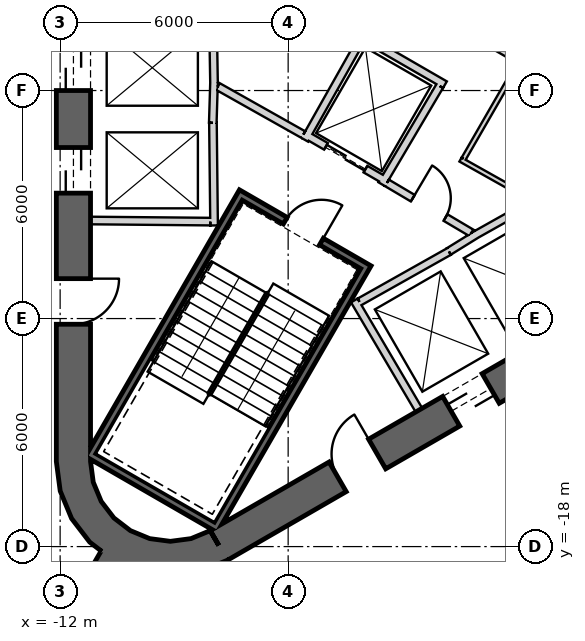
"""IFC4 building model, lengths in metres.
Left out: names, types, materials, properties, quantities, classifications, styles, units other than length and angle.
Written with IfcOpenShell. Run it as: python <this file> out.ifc"""

import sys

from ifc_helpers import new_model, si_unit, direction, frame, frame_2d, origin, place, context, subcontext, project, spatial, polyline, rectangle, outline, extrude, element, fill, save


model = new_model("IFC4")
c1 = context("Model", 3, precision=1e-05, world=origin(), true_north=direction((0.0, 1.0)))
c2 = subcontext(c1, "Body", "Model", "MODEL_VIEW")
j1 = project(units=[si_unit("LENGTHUNIT", "METRE"), si_unit("PLANEANGLEUNIT", "RADIAN")], contexts=[c1])
p1 = place(None, origin())
s1 = spatial("IfcSite", under=j1, at=p1, CompositionType="ELEMENT")
p2 = place(p1, origin())
s2 = spatial("IfcBuilding", under=s1, at=p2, CompositionType="ELEMENT")
p3 = place(p2, frame((0.0, 0.0, 107.0)))
s3 = spatial("IfcBuildingStorey", under=s2, at=p3, CompositionType="ELEMENT", Elevation=107.0)
p4 = place(p3, frame((-11.65, 15.762, 0.0), z_axis=(0.0, 0.0, 1.0), x_axis=(0.0, -1.0, 0.0)))
e1 = element("IfcWall", 1, at=p4, inside=s3, PredefinedType="SHEAR", context=c2, shape_type="SweptSolid", body=[
    extrude(rectangle(XDim=31.523, YDim=0.9, at=frame_2d((15.762, 0.0))), origin(), (0.0, 0.0, 1.0), 4.1),
])
p5 = place(p4, frame((7.062, 0.0, 0.0)))
e2 = element("IfcOpeningElement", 2, at=p5, cuts=e1, PredefinedType="OPENING", context=c2, shape_type="SweptSolid", body=[
    extrude(rectangle(XDim=1.2, YDim=2.4, at=frame_2d((0.6, 1.2))), frame((0.0, 0.46, 0.0), z_axis=(0.0, -1.0, 0.0), x_axis=(1.0, 0.0, 0.0)), (0.0, 0.0, 1.0), 0.92),
])
p6 = place(p4, frame((9.762, 0.0, 0.0)))
e3 = element("IfcOpeningElement", 3, at=p6, cuts=e1, PredefinedType="OPENING", context=c2, shape_type="SweptSolid", body=[
    extrude(rectangle(XDim=1.2, YDim=2.4, at=frame_2d((0.6, 1.2))), frame((0.0, 0.46, 0.0), z_axis=(0.0, -1.0, 0.0), x_axis=(1.0, 0.0, 0.0)), (0.0, 0.0, 1.0), 0.92),
])
p7 = place(p4, frame((12.462, 0.0, 0.0)))
e4 = element("IfcOpeningElement", 4, at=p7, cuts=e1, PredefinedType="OPENING", context=c2, shape_type="SweptSolid", body=[
    extrude(rectangle(XDim=1.2, YDim=2.4, at=frame_2d((0.6, 1.2))), frame((0.0, 0.46, 0.0), z_axis=(0.0, -1.0, 0.0), x_axis=(1.0, 0.0, 0.0)), (0.0, 0.0, 1.0), 0.92),
])
p8 = place(p4, frame((15.162, 0.0, 0.0)))
e5 = element("IfcOpeningElement", 5, at=p8, cuts=e1, PredefinedType="OPENING", context=c2, shape_type="SweptSolid", body=[
    extrude(rectangle(XDim=1.2, YDim=2.4, at=frame_2d((0.6, 1.2))), frame((0.0, 0.46, 0.0), z_axis=(0.0, -1.0, 0.0), x_axis=(1.0, 0.0, 0.0)), (0.0, 0.0, 1.0), 0.92),
])
p9 = place(p4, frame((17.862, 0.0, 0.0)))
e6 = element("IfcOpeningElement", 6, at=p9, cuts=e1, PredefinedType="OPENING", context=c2, shape_type="SweptSolid", body=[
    extrude(rectangle(XDim=1.2, YDim=2.4, at=frame_2d((0.6, 1.2))), frame((0.0, 0.46, 0.0), z_axis=(0.0, -1.0, 0.0), x_axis=(1.0, 0.0, 0.0)), (0.0, 0.0, 1.0), 0.92),
])
p10 = place(p4, frame((20.562, 0.0, 0.0)))
e7 = element("IfcOpeningElement", 7, at=p10, cuts=e1, PredefinedType="OPENING", context=c2, shape_type="SweptSolid", body=[
    extrude(rectangle(XDim=1.2, YDim=2.4, at=frame_2d((0.6, 1.2))), frame((0.0, 0.46, 0.0), z_axis=(0.0, -1.0, 0.0), x_axis=(1.0, 0.0, 0.0)), (0.0, 0.0, 1.0), 0.92),
])
p11 = place(p4, frame((23.262, 0.0, 0.0)))
e8 = element("IfcOpeningElement", 8, at=p11, cuts=e1, PredefinedType="OPENING", context=c2, shape_type="SweptSolid", body=[
    extrude(rectangle(XDim=1.2, YDim=2.4, at=frame_2d((0.6, 1.2))), frame((0.0, 0.46, 0.0), z_axis=(0.0, -1.0, 0.0), x_axis=(1.0, 0.0, 0.0)), (0.0, 0.0, 1.0), 0.92),
])
p12 = place(p4, frame((3.612, 0.0, 0.0)))
e9 = element("IfcOpeningElement", 9, at=p12, cuts=e1, PredefinedType="OPENING", context=c2, shape_type="SweptSolid", body=[
    extrude(rectangle(XDim=1.2, YDim=2.4, at=frame_2d((0.6, 1.2))), frame((0.0, 0.46, 0.0), z_axis=(0.0, -1.0, 0.0), x_axis=(1.0, 0.0, 0.0)), (0.0, 0.0, 1.0), 0.92),
])
p13 = place(p4, frame((26.712, 0.0, 0.0)))
e10 = element("IfcOpeningElement", 10, at=p13, cuts=e1, PredefinedType="OPENING", context=c2, shape_type="SweptSolid", body=[
    extrude(rectangle(XDim=1.2, YDim=2.4, at=frame_2d((0.6, 1.2))), frame((0.0, 0.46, 0.0), z_axis=(0.0, -1.0, 0.0), x_axis=(1.0, 0.0, 0.0)), (0.0, 0.0, 1.0), 0.92),
])
p14 = place(p3, frame((-7.825, -17.97, 0.0), z_axis=(0.0, 0.0, 1.0), x_axis=(0.866028369851, 0.499994862586, 0.0)))
e11 = element("IfcWall", 11, at=p14, inside=s3, PredefinedType="SHEAR", context=c2, shape_type="SweptSolid", body=[
    extrude(rectangle(XDim=31.523, YDim=0.9, at=frame_2d((15.762, 0.0))), origin(), (0.0, 0.0, 1.0), 4.1),
])
p15 = place(p14, frame((7.062, 0.0, 0.0)))
e12 = element("IfcOpeningElement", 12, at=p15, cuts=e11, PredefinedType="OPENING", context=c2, shape_type="SweptSolid", body=[
    extrude(rectangle(XDim=1.2, YDim=2.4, at=frame_2d((0.6, 1.2))), frame((0.0, 0.46, 0.0), z_axis=(0.0, -1.0, 0.0), x_axis=(1.0, 0.0, 0.0)), (0.0, 0.0, 1.0), 0.92),
])
p16 = place(p14, frame((9.762, 0.0, 0.0)))
e13 = element("IfcOpeningElement", 13, at=p16, cuts=e11, PredefinedType="OPENING", context=c2, shape_type="SweptSolid", body=[
    extrude(rectangle(XDim=1.2, YDim=2.4, at=frame_2d((0.6, 1.2))), frame((0.0, 0.46, 0.0), z_axis=(0.0, -1.0, 0.0), x_axis=(1.0, 0.0, 0.0)), (0.0, 0.0, 1.0), 0.92),
])
p17 = place(p14, frame((12.462, 0.0, 0.0)))
e14 = element("IfcOpeningElement", 14, at=p17, cuts=e11, PredefinedType="OPENING", context=c2, shape_type="SweptSolid", body=[
    extrude(rectangle(XDim=1.2, YDim=2.4, at=frame_2d((0.6, 1.2))), frame((0.0, 0.46, 0.0), z_axis=(0.0, -1.0, 0.0), x_axis=(1.0, 0.0, 0.0)), (0.0, 0.0, 1.0), 0.92),
])
p18 = place(p14, frame((15.162, 0.0, 0.0)))
e15 = element("IfcOpeningElement", 15, at=p18, cuts=e11, PredefinedType="OPENING", context=c2, shape_type="SweptSolid", body=[
    extrude(rectangle(XDim=1.2, YDim=2.4, at=frame_2d((0.6, 1.2))), frame((0.0, 0.46, 0.0), z_axis=(0.0, -1.0, 0.0), x_axis=(1.0, 0.0, 0.0)), (0.0, 0.0, 1.0), 0.92),
])
p19 = place(p14, frame((17.862, 0.0, 0.0)))
e16 = element("IfcOpeningElement", 16, at=p19, cuts=e11, PredefinedType="OPENING", context=c2, shape_type="SweptSolid", body=[
    extrude(rectangle(XDim=1.2, YDim=2.4, at=frame_2d((0.6, 1.2))), frame((0.0, 0.46, 0.0), z_axis=(0.0, -1.0, 0.0), x_axis=(1.0, 0.0, 0.0)), (0.0, 0.0, 1.0), 0.92),
])
p20 = place(p14, frame((20.562, 0.0, 0.0)))
e17 = element("IfcOpeningElement", 17, at=p20, cuts=e11, PredefinedType="OPENING", context=c2, shape_type="SweptSolid", body=[
    extrude(rectangle(XDim=1.2, YDim=2.4, at=frame_2d((0.6, 1.2))), frame((0.0, 0.46, 0.0), z_axis=(0.0, -1.0, 0.0), x_axis=(1.0, 0.0, 0.0)), (0.0, 0.0, 1.0), 0.92),
])
p21 = place(p14, frame((26.712, 0.0, 0.0)))
e18 = element("IfcOpeningElement", 18, at=p21, cuts=e11, PredefinedType="OPENING", context=c2, shape_type="SweptSolid", body=[
    extrude(rectangle(XDim=1.2, YDim=2.4, at=frame_2d((0.6, 1.2))), frame((0.0, 0.46, 0.0), z_axis=(0.0, -1.0, 0.0), x_axis=(1.0, 0.0, 0.0)), (0.0, 0.0, 1.0), 0.92),
])
p22 = place(p14, frame((3.612, 0.0, 0.0)))
e19 = element("IfcOpeningElement", 19, at=p22, cuts=e11, PredefinedType="OPENING", context=c2, shape_type="SweptSolid", body=[
    extrude(rectangle(XDim=1.2, YDim=2.4, at=frame_2d((0.6, 1.2))), frame((0.0, 0.46, 0.0), z_axis=(0.0, -1.0, 0.0), x_axis=(1.0, 0.0, 0.0)), (0.0, 0.0, 1.0), 0.92),
])
p23 = place(p3, origin())
e20 = element("IfcWall", 20, at=p23, inside=s3, PredefinedType="SHEAR", context=c2, shape_type="SweptSolid", body=[
    extrude(outline(polyline([(-12.1, -15.762), (-11.998, -16.538), (-11.698, -17.262), (-11.221, -17.883), (-10.6, -18.36), (-9.876, -18.659), (-9.1, -18.762), (-8.323, -18.659), (-7.6, -18.36), (-8.05, -17.58), (-8.556, -17.79), (-9.1, -17.862), (-9.644, -17.79), (-10.15, -17.58), (-10.585, -17.247), (-10.919, -16.812), (-11.128, -16.305), (-11.2, -15.762), (-12.1, -15.762)])), origin(), (0.0, 0.0, 1.0), 4.1),
])
p24 = place(p3, frame((-10.575, -18.316, 0.0), z_axis=(0.0, 0.0, 1.0), x_axis=(-0.500003112169, -0.866023606965, 0.0)))
e21 = element("IfcWall", 21, at=p24, inside=s3, PredefinedType="SHEAR", context=c2, shape_type="SweptSolid", body=[
    extrude(rectangle(XDim=13.027, YDim=0.8, at=frame_2d((6.513, 0.0))), origin(), (0.0, 0.0, 1.0), 4.1),
])
p25 = place(p24, frame((1.3, 0.0, 0.0)))
e22 = element("IfcOpeningElement", 22, at=p25, cuts=e21, PredefinedType="OPENING", context=c2, shape_type="SweptSolid", body=[
    extrude(rectangle(XDim=1.4, YDim=2.4, at=frame_2d((0.7, 1.2))), frame((0.0, 0.41, 0.0), z_axis=(0.0, -1.0, 0.0), x_axis=(1.0, 0.0, 0.0)), (0.0, 0.0, 1.0), 0.82),
])
p26 = place(p3, frame((-7.95, -5.772, 0.0), z_axis=(0.0, 0.0, 1.0), x_axis=(-0.030803413295, -0.999525462272, 0.0)))
e23 = element("IfcWall", 23, at=p26, inside=s3, PredefinedType="PLUMBINGWALL", context=c2, shape_type="SweptSolid", body=[
    extrude(rectangle(XDim=1.078, YDim=0.2, at=frame_2d((0.539, 0.0))), origin(), (0.0, 0.0, 1.0), 3.8),
])
p27 = place(p3, frame((-7.98, -4.05, 0.0), z_axis=(0.0, 0.0, 1.0), x_axis=(0.016809909365, -0.999858703491, 0.0)))
e24 = element("IfcWall", 24, at=p27, inside=s3, PredefinedType="PLUMBINGWALL", context=c2, shape_type="SweptSolid", body=[
    extrude(rectangle(XDim=1.844, YDim=0.2, at=frame_2d((0.922, 0.0))), origin(), (0.0, 0.0, 1.0), 3.8),
])
p28 = place(p3, frame((-7.979, -6.85, 0.0), z_axis=(0.0, 0.0, 1.0), x_axis=(0.011121475088, -0.999938154483, 0.0)))
e25 = element("IfcWall", 25, at=p28, inside=s3, PredefinedType="PLUMBINGWALL", context=c2, shape_type="SweptSolid", body=[
    extrude(rectangle(XDim=2.7, YDim=0.2, at=frame_2d((1.35, 0.0))), origin(), (0.0, 0.0, 1.0), 3.8),
])
p29 = place(p3, frame((-8.05, -9.449, 0.0), z_axis=(0.0, 0.0, 1.0), x_axis=(-0.999957467379, 0.009222983926, 0.0)))
e26 = element("IfcWall", 26, at=p29, inside=s3, PredefinedType="PLUMBINGWALL", context=c2, shape_type="SweptSolid", body=[
    extrude(rectangle(XDim=3.15, YDim=0.2, at=frame_2d((1.575, 0.0))), origin(), (0.0, 0.0, 1.0), 3.8),
])
p30 = place(p3, frame((-2.558, -14.409, 0.0), z_axis=(0.0, 0.0, 1.0), x_axis=(-0.507997497166, 0.861358544901, 0.0)))
e27 = element("IfcWall", 27, at=p30, inside=s3, PredefinedType="PLUMBINGWALL", context=c2, shape_type="SweptSolid", body=[
    extrude(rectangle(XDim=3.35, YDim=0.2, at=frame_2d((1.675, 0.0))), origin(), (0.0, 0.0, 1.0), 3.8),
])
p31 = place(p3, frame((-1.769, -10.237, 0.0), z_axis=(0.0, 0.0, 1.0), x_axis=(-0.871534483978, -0.490334215854, 0.0)))
e28 = element("IfcWall", 28, at=p31, inside=s3, PredefinedType="PLUMBINGWALL", context=c2, shape_type="SweptSolid", body=[
    extrude(rectangle(XDim=2.7, YDim=0.2, at=frame_2d((1.35, 0.0))), origin(), (0.0, 0.0, 1.0), 3.8),
])
p32 = place(p3, frame((-1.024, -9.771, 0.0), z_axis=(0.0, 0.0, 1.0), x_axis=(-0.850348075135, -0.526220629693, 0.0)))
e29 = element("IfcWall", 29, at=p32, inside=s3, PredefinedType="PLUMBINGWALL", context=c2, shape_type="SweptSolid", body=[
    extrude(rectangle(XDim=0.878, YDim=0.2, at=frame_2d((0.439, 0.0))), origin(), (0.0, 0.0, 1.0), 3.8),
])
p33 = place(p3, frame((-1.13, -9.832, 0.0), z_axis=(0.0, 0.0, 1.0), x_axis=(0.871988740738, 0.489525929882, 0.0)))
e30 = element("IfcWall", 30, at=p33, inside=s3, PredefinedType="PLUMBINGWALL", context=c2, shape_type="SweptSolid", body=[
    extrude(rectangle(XDim=1.845, YDim=0.2, at=frame_2d((0.922, 0.0))), origin(), (0.0, 0.0, 1.0), 3.8),
])
p34 = place(p3, frame((-3.905, -10.563, -0.3), z_axis=(0.0, 0.0, 1.0), x_axis=(-0.500012932018, -0.866017937352, 0.0)))
e31 = element("IfcWall", 31, at=p34, inside=s3, PredefinedType="SHEAR", context=c2, shape_type="SweptSolid", body=[
    extrude(rectangle(XDim=8.1, YDim=0.2, at=frame_2d((4.05, 0.0))), origin(), (0.0, 0.0, 1.0), 4.1),
])
p35 = place(p3, frame((-11.282, -15.541, -0.3), z_axis=(0.0, 0.0, 1.0), x_axis=(0.866000483506, -0.500043160704, 0.0)))
e32 = element("IfcWall", 32, at=p35, inside=s3, PredefinedType="SHEAR", context=c2, shape_type="SweptSolid", body=[
    extrude(rectangle(XDim=3.8, YDim=0.2, at=frame_2d((1.9, 0.0))), origin(), (0.0, 0.0, 1.0), 4.1),
])
p36 = place(p3, frame((-7.196, -8.663, -0.3), z_axis=(0.0, 0.0, 1.0), x_axis=(-0.499997992926, -0.866026562566, 0.0)))
e33 = element("IfcWall", 33, at=p36, inside=s3, PredefinedType="SHEAR", context=c2, shape_type="SweptSolid", body=[
    extrude(rectangle(XDim=7.9, YDim=0.2, at=frame_2d((3.95, 0.0))), origin(), (0.0, 0.0, 1.0), 4.1),
])
p37 = place(p3, frame((-4.041, -10.599, -0.3), z_axis=(0.0, 0.0, 1.0), x_axis=(-0.866047807691, 0.499961193289, 0.0)))
e34 = element("IfcWall", 34, at=p37, inside=s3, PredefinedType="SHEAR", context=c2, shape_type="SweptSolid", body=[
    extrude(rectangle(XDim=3.6, YDim=0.2, at=frame_2d((1.8, 0.0))), origin(), (0.0, 0.0, 1.0), 4.1),
])
p38 = place(p37, frame((1.25, 0.0, 0.3)))
e35 = element("IfcOpeningElement", 35, at=p38, cuts=e34, PredefinedType="OPENING", context=c2, shape_type="SweptSolid", body=[
    extrude(rectangle(XDim=1.1, YDim=2.1, at=frame_2d((0.55, 1.05))), frame((0.0, 0.11, 0.0), z_axis=(0.0, -1.0, 0.0), x_axis=(1.0, 0.0, 0.0)), (0.0, 0.0, 1.0), 0.22),
])
p39 = place(p3, frame((-3.446, -8.368, 0.0), z_axis=(0.0, 0.0, 1.0), x_axis=(-0.866024647952, 0.500001309137, 0.0)))
e36 = element("IfcWall", 36, at=p39, inside=s3, PredefinedType="PLUMBINGWALL", context=c2, shape_type="SweptSolid", body=[
    extrude(rectangle(XDim=2.4, YDim=0.2, at=frame_2d((1.2, 0.0))), origin(), (0.0, 0.0, 1.0), 3.8),
])
p40 = place(p39, frame((0.6, 0.0, 0.0)))
e37 = element("IfcOpeningElement", 37, at=p40, cuts=e36, PredefinedType="OPENING", context=c2, shape_type="SweptSolid", body=[
    extrude(rectangle(XDim=1.2, YDim=2.4, at=frame_2d((0.6, 1.2))), frame((0.0, 0.11, 0.0), z_axis=(0.0, -1.0, 0.0), x_axis=(1.0, 0.0, 0.0)), (0.0, 0.0, 1.0), 0.22),
])
p41 = place(p3, frame((-5.562, -7.296, 0.0), z_axis=(0.0, 0.0, 1.0), x_axis=(0.491322718731, 0.870977603649, 0.0)))
e38 = element("IfcWall", 38, at=p41, inside=s3, PredefinedType="PLUMBINGWALL", context=c2, shape_type="SweptSolid", body=[
    extrude(rectangle(XDim=3.1, YDim=0.2, at=frame_2d((1.55, 0.0))), origin(), (0.0, 0.0, 1.0), 3.8),
])
p42 = place(p3, frame((-3.892, -4.681, 0.0), z_axis=(0.0, 0.0, 1.0), x_axis=(0.866009305107, -0.50002788269, 0.0)))
e39 = element("IfcWall", 39, at=p42, inside=s3, PredefinedType="PLUMBINGWALL", context=c2, shape_type="SweptSolid", body=[
    extrude(rectangle(XDim=2.329, YDim=0.2, at=frame_2d((1.165, 0.0))), origin(), (0.0, 0.0, 1.0), 3.8),
])
p43 = place(p3, frame((-2.012, -5.882, 0.0), z_axis=(0.0, 0.0, 1.0), x_axis=(-0.508619639323, -0.860991325447, 0.0)))
e40 = element("IfcWall", 40, at=p43, inside=s3, PredefinedType="PLUMBINGWALL", context=c2, shape_type="SweptSolid", body=[
    extrude(rectangle(XDim=3.0, YDim=0.2, at=frame_2d((1.5, 0.0))), origin(), (0.0, 0.0, 1.0), 3.8),
])
p44 = place(p3, frame((-7.849, -5.894, 0.0), z_axis=(0.0, 0.0, 1.0), x_axis=(0.871340486379, -0.490678873396, 0.0)))
e41 = element("IfcWall", 41, at=p44, inside=s3, PredefinedType="PARTITIONING", context=c2, shape_type="SweptSolid", body=[
    extrude(rectangle(XDim=2.581, YDim=0.2, at=frame_2d((1.291, 0.0))), origin(), (0.0, 0.0, 1.0), 3.8),
])
p45 = place(p3, frame((-3.401, -8.43, 0.0), z_axis=(0.0, 0.0, 1.0), x_axis=(0.860598681535, -0.509283721849, 0.0)))
e42 = element("IfcWall", 42, at=p45, inside=s3, PredefinedType="PARTITIONING", context=c2, shape_type="SweptSolid", body=[
    extrude(rectangle(XDim=2.581, YDim=0.2, at=frame_2d((1.291, 0.0))), origin(), (0.0, 0.0, 1.0), 3.8),
])
p46 = place(p45, frame((0.791, 0.0, 0.0)))
e43 = element("IfcOpeningElement", 43, at=p46, cuts=e42, PredefinedType="OPENING", context=c2, shape_type="SweptSolid", body=[
    extrude(rectangle(XDim=1.0, YDim=2.1, at=frame_2d((0.5, 1.05))), frame((0.0, 0.11, 0.0), z_axis=(0.0, -1.0, 0.0), x_axis=(1.0, 0.0, 0.0)), (0.0, 0.0, 1.0), 0.22),
])
p47 = place(p3, frame((-1.464, -7.816, 0.0), z_axis=(0.0, 0.0, 1.0), x_axis=(0.871880202732, -0.489719217597, 0.0)))
e44 = element("IfcWall", 44, at=p47, inside=s3, PredefinedType="PARTITIONING", context=c2, shape_type="SweptSolid", body=[
    extrude(rectangle(XDim=2.224, YDim=0.12, at=frame_2d((1.112, 0.0))), origin(), (0.0, 0.0, 1.0), 3.8),
])
p48 = place(p3, frame((0.118, -5.195, 0.0), z_axis=(0.0, 0.0, 1.0), x_axis=(-0.499990139034, -0.866031096941, 0.0)))
e45 = element("IfcWall", 45, at=p48, inside=s3, PredefinedType="PARTITIONING", context=c2, shape_type="SweptSolid", body=[
    extrude(rectangle(XDim=3.0, YDim=0.12, at=frame_2d((1.5, 0.0))), origin(), (0.0, 0.0, 1.0), 3.8),
])
p49 = place(p3, frame((-1.501, -4.33, 0.0), z_axis=(0.0, 0.0, 1.0), x_axis=(0.866059624469, -0.499940723351, 0.0)))
e46 = element("IfcWall", 46, at=p49, inside=s3, PredefinedType="PARTITIONING", context=c2, shape_type="SweptSolid", body=[
    extrude(rectangle(XDim=1.775, YDim=0.12, at=frame_2d((0.888, 0.0))), origin(), (0.0, 0.0, 1.0), 3.8),
])
p50 = place(p3, frame((-6.227, -22.648, 0.0), z_axis=(0.0, 0.0, 1.0), x_axis=(0.866024349396, 0.50000182625, 0.0)))
e47 = element("IfcWall", 47, at=p50, inside=s3, PredefinedType="PARTITIONING", context=c2, shape_type="SweptSolid", body=[
    extrude(rectangle(XDim=33.234, YDim=0.2, at=frame_2d((16.617, 0.0))), origin(), (0.0, 0.0, 1.0), 2.98),
])
p51 = place(p50, frame((16.167, 0.0, 0.0)))
e48 = element("IfcOpeningElement", 48, at=p51, cuts=e47, PredefinedType="OPENING", context=c2, shape_type="SweptSolid", body=[
    extrude(rectangle(XDim=1.0, YDim=2.1, at=frame_2d((0.5, 1.05))), frame((0.0, 0.11, 0.0), z_axis=(0.0, -1.0, 0.0), x_axis=(1.0, 0.0, 0.0)), (0.0, 0.0, 1.0), 0.22),
])
p52 = place(p38, origin())
e49 = element("IfcDoor", 49, at=p52, inside=s3, OperationType="SINGLE_SWING_LEFT", PredefinedType="USERDEFINED", context=c2, shape_type="SweptSolid", body=[
    extrude(rectangle(XDim=1.1, YDim=2.1, at=frame_2d((0.55, 1.05))), frame((0.0, 0.025, 0.0), z_axis=(0.0, -1.0, 0.0), x_axis=(1.0, 0.0, 0.0)), (0.0, 0.0, 1.0), 0.05),
])
fill(e35, e49)
p53 = place(p46, origin())
e50 = element("IfcDoor", 50, at=p53, inside=s3, OperationType="SINGLE_SWING_LEFT", PredefinedType="USERDEFINED", context=c2, shape_type="SweptSolid", body=[
    extrude(rectangle(XDim=1.0, YDim=2.1, at=frame_2d((0.5, 1.05))), frame((0.0, 0.025, 0.0), z_axis=(0.0, -1.0, 0.0), x_axis=(1.0, 0.0, 0.0)), (0.0, 0.0, 1.0), 0.05),
])
fill(e43, e50)
p54 = place(p40, origin())
e51 = element("IfcDoor", 51, at=p54, inside=s3, OperationType="SLIDING_TO_LEFT", PredefinedType="USERDEFINED", context=c2, shape_type="SweptSolid", body=[
    extrude(rectangle(XDim=1.2, YDim=2.4, at=frame_2d((0.6, 1.2))), frame((0.0, 0.025, 0.0), z_axis=(0.0, -1.0, 0.0), x_axis=(1.0, 0.0, 0.0)), (0.0, 0.0, 1.0), 0.05),
])
fill(e37, e51)
p55 = place(p10, origin())
e52 = element("IfcDoor", 52, at=p55, inside=s3, OperationType="SLIDING_TO_LEFT", PredefinedType="USERDEFINED", context=c2, shape_type="SweptSolid", body=[
    extrude(rectangle(XDim=1.2, YDim=2.4, at=frame_2d((0.6, 1.2))), frame((0.0, 0.025, 0.0), z_axis=(0.0, -1.0, 0.0), x_axis=(1.0, 0.0, 0.0)), (0.0, 0.0, 1.0), 0.05),
])
fill(e7, e52)
p56 = place(p11, origin())
e53 = element("IfcDoor", 53, at=p56, inside=s3, OperationType="SLIDING_TO_LEFT", PredefinedType="USERDEFINED", context=c2, shape_type="SweptSolid", body=[
    extrude(rectangle(XDim=1.2, YDim=2.4, at=frame_2d((0.6, 1.2))), frame((0.0, 0.025, 0.0), z_axis=(0.0, -1.0, 0.0), x_axis=(1.0, 0.0, 0.0)), (0.0, 0.0, 1.0), 0.05),
])
fill(e8, e53)
p57 = place(p15, origin())
e54 = element("IfcDoor", 54, at=p57, inside=s3, OperationType="SLIDING_TO_LEFT", PredefinedType="USERDEFINED", context=c2, shape_type="SweptSolid", body=[
    extrude(rectangle(XDim=1.2, YDim=2.4, at=frame_2d((0.6, 1.2))), frame((0.0, 0.025, 0.0), z_axis=(0.0, -1.0, 0.0), x_axis=(1.0, 0.0, 0.0)), (0.0, 0.0, 1.0), 0.05),
])
fill(e12, e54)
p58 = place(p13, origin())
e55 = element("IfcDoor", 55, at=p58, inside=s3, OperationType="SINGLE_SWING_LEFT", PredefinedType="USERDEFINED", context=c2, shape_type="SweptSolid", body=[
    extrude(rectangle(XDim=1.2, YDim=2.4, at=frame_2d((0.6, 1.2))), frame((0.0, 0.025, 0.0), z_axis=(0.0, -1.0, 0.0), x_axis=(1.0, 0.0, 0.0)), (0.0, 0.0, 1.0), 0.05),
])
fill(e10, e55)
p59 = place(p22, origin())
e56 = element("IfcDoor", 56, at=p59, inside=s3, OperationType="SINGLE_SWING_RIGHT", PredefinedType="USERDEFINED", context=c2, shape_type="SweptSolid", body=[
    extrude(rectangle(XDim=1.2, YDim=2.4, at=frame_2d((0.6, 1.2))), frame((0.0, 0.025, 0.0), z_axis=(0.0, -1.0, 0.0), x_axis=(1.0, 0.0, 0.0)), (0.0, 0.0, 1.0), 0.05),
])
fill(e19, e56)
save(model, sys.argv[1])
